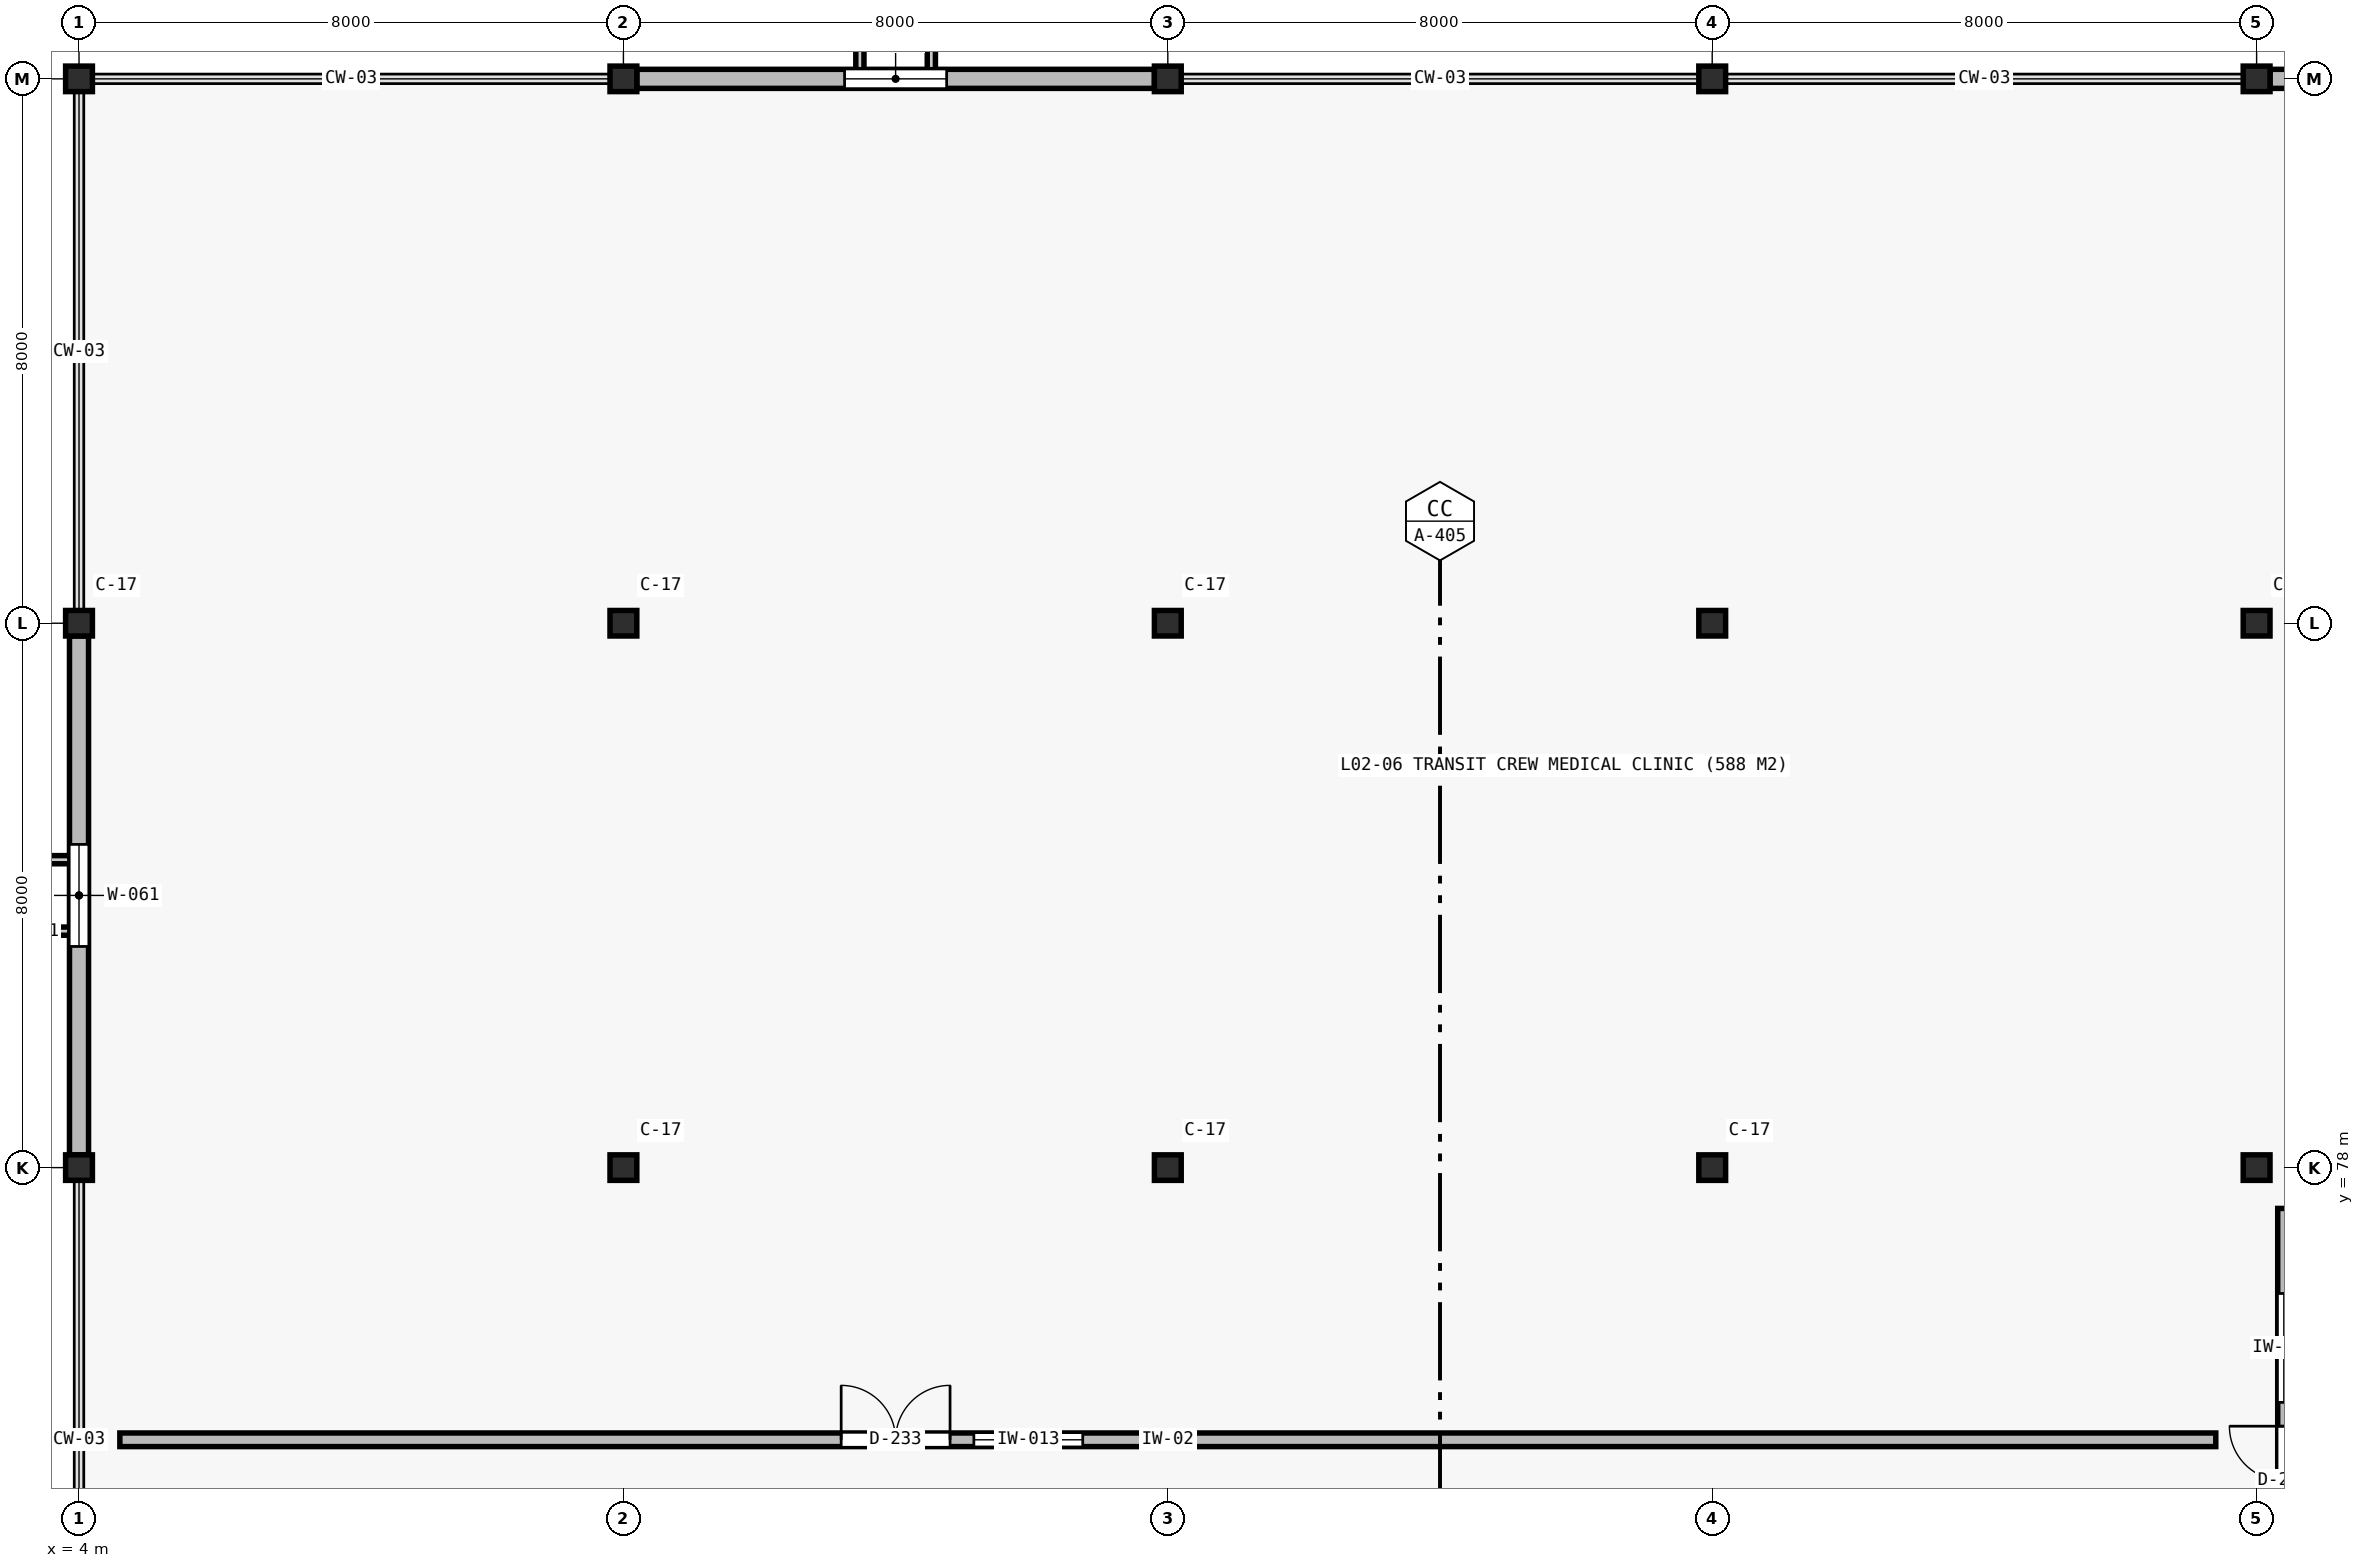
"""IFC4 building model, lengths in metres.
Left out: names, types, materials, properties, quantities, classifications, styles, units other than length and angle.
Written with IfcOpenShell. Run it as: python <this file> out.ifc"""

import sys

from ifc_helpers import new_model, si_unit, direction, frame, frame_2d, origin, origin_2d, place, context, subcontext, project, spatial, rectangle, i_section, extrude, element, fill, save


model = new_model("IFC4")
c1 = context("Model", 3, precision=1e-05, world=origin(), true_north=direction((0.0, 1.0)))
c2 = subcontext(c1, "Body", "Model", "MODEL_VIEW")
j1 = project(units=[si_unit("LENGTHUNIT", "METRE"), si_unit("PLANEANGLEUNIT", "RADIAN")], contexts=[c1])
p1 = place(None, origin())
s1 = spatial("IfcSite", under=j1, at=p1, CompositionType="ELEMENT")
p2 = place(p1, origin())
s2 = spatial("IfcBuilding", under=s1, at=p2, CompositionType="ELEMENT")
p3 = place(p2, frame((0.0, 0.0, 11.2)))
s3 = spatial("IfcBuildingStorey", under=s2, at=p3, CompositionType="ELEMENT", Elevation=11.2)
for number, where, z_axis, x_axis in (
    (1, (4.0, 78.0, 0.0), (0.0, 0.0, 1.0), (1.0, 0.0, 0.0)),
    (2, (4.0, 86.0, 0.0), (0.0, 0.0, 1.0), (1.0, 0.0, 0.0)),
    (3, (4.0, 94.0, 0.0), (0.0, 0.0, 1.0), (1.0, 0.0, 0.0)),
    (4, (12.0, 78.0, 0.0), (0.0, 0.0, 1.0), (1.0, 0.0, 0.0)),
    (5, (12.0, 86.0, 0.0), (0.0, 0.0, 1.0), (1.0, 0.0, 0.0)),
    (6, (12.0, 94.0, 0.0), (0.0, 0.0, 1.0), (1.0, 0.0, 0.0)),
    (7, (20.0, 78.0, 0.0), (0.0, 0.0, 1.0), (1.0, 0.0, 0.0)),
    (8, (20.0, 86.0, 0.0), (0.0, 0.0, 1.0), (1.0, 0.0, 0.0)),
    (9, (20.0, 94.0, 0.0), (0.0, 0.0, 1.0), (1.0, 0.0, 0.0)),
    (10, (28.0, 78.0, 0.0), (0.0, 0.0, 1.0), (1.0, 0.0, 0.0)),
    (11, (28.0, 86.0, 0.0), (0.0, 0.0, 1.0), (1.0, 0.0, 0.0)),
    (12, (28.0, 94.0, 0.0), (0.0, 0.0, 1.0), (1.0, 0.0, 0.0)),
    (13, (36.0, 78.0, 0.0), (0.0, 0.0, 1.0), (1.0, 0.0, 0.0)),
    (14, (36.0, 86.0, 0.0), (0.0, 0.0, 1.0), (1.0, 0.0, 0.0)),
    (15, (36.0, 94.0, 0.0), (0.0, 0.0, 1.0), (1.0, 0.0, 0.0)),
):
    element("IfcColumn", number, at=place(p3, frame(where, z_axis=z_axis, x_axis=x_axis)), inside=s3, PredefinedType="COLUMN", context=c2, shape_type="SweptSolid", body=[
        extrude(i_section(OverallWidth=0.394, OverallDepth=0.375, WebThickness=0.017, FlangeThickness=0.028, at=origin_2d()), origin(), (0.0, 0.0, 1.0), 4.0),
    ])
p4 = place(p3, frame((4.0, 78.188, 0.0), z_axis=(0.0, 0.0, 1.0), x_axis=(0.0, 1.0, 0.0)))
e16 = element("IfcWall", 16, at=p4, inside=s3, PredefinedType="STANDARD", context=c2, shape_type="SweptSolid", body=[
    extrude(rectangle(XDim=7.625, YDim=0.28, at=frame_2d((3.812, 0.0))), origin(), (0.0, 0.0, 1.0), 3.25),
])
p5 = place(p4, frame((3.062, 0.0, 0.95)))
e17 = element("IfcOpeningElement", 17, at=p5, cuts=e16, PredefinedType="OPENING", context=c2, shape_type="SweptSolid", body=[
    extrude(rectangle(XDim=1.5, YDim=2.0, at=frame_2d((0.75, 1.0))), frame((0.0, 0.15, 0.0), z_axis=(0.0, -1.0, 0.0), x_axis=(1.0, 0.0, 0.0)), (0.0, 0.0, 1.0), 0.3),
])
p6 = place(p3, frame((12.197, 94.0, 0.0), z_axis=(0.0, 0.0, 1.0), x_axis=(1.0, 0.0, 0.0)))
e18 = element("IfcWall", 18, at=p6, inside=s3, PredefinedType="STANDARD", context=c2, shape_type="SweptSolid", body=[
    extrude(rectangle(XDim=7.606, YDim=0.28, at=frame_2d((3.803, 0.0))), origin(), (0.0, 0.0, 1.0), 3.25),
])
p7 = place(p6, frame((3.053, 0.0, 0.95)))
e19 = element("IfcOpeningElement", 19, at=p7, cuts=e18, PredefinedType="OPENING", context=c2, shape_type="SweptSolid", body=[
    extrude(rectangle(XDim=1.5, YDim=2.0, at=frame_2d((0.75, 1.0))), frame((0.0, 0.15, 0.0), z_axis=(0.0, -1.0, 0.0), x_axis=(1.0, 0.0, 0.0)), (0.0, 0.0, 1.0), 0.3),
])
p8 = place(p3, frame((36.197, 94.0, 0.0), z_axis=(0.0, 0.0, 1.0), x_axis=(1.0, 0.0, 0.0)))
e20 = element("IfcWall", 20, at=p8, inside=s3, PredefinedType="STANDARD", context=c2, shape_type="SweptSolid", body=[
    extrude(rectangle(XDim=7.606, YDim=0.28, at=frame_2d((3.803, 0.0))), origin(), (0.0, 0.0, 1.0), 3.25),
])
p9 = place(p8, frame((3.053, 0.0, 0.95)))
e21 = element("IfcOpeningElement", 21, at=p9, cuts=e20, PredefinedType="OPENING", context=c2, shape_type="SweptSolid", body=[
    extrude(rectangle(XDim=1.5, YDim=2.0, at=frame_2d((0.75, 1.0))), frame((0.0, 0.15, 0.0), z_axis=(0.0, -1.0, 0.0), x_axis=(1.0, 0.0, 0.0)), (0.0, 0.0, 1.0), 0.3),
])
p10 = place(p3, frame((4.6, 74.0, 0.0), z_axis=(0.0, 0.0, 1.0), x_axis=(1.0, 0.0, 0.0)))
e22 = element("IfcWall", 22, at=p10, inside=s3, PredefinedType="PARTITIONING", context=c2, shape_type="SweptSolid", body=[
    extrude(rectangle(XDim=30.8, YDim=0.2, at=frame_2d((15.4, 0.0))), origin(), (0.0, 0.0, 1.0), 4.0),
])
p11 = place(p10, frame((10.6, 0.0, 0.0)))
e23 = element("IfcOpeningElement", 23, at=p11, cuts=e22, PredefinedType="OPENING", context=c2, shape_type="SweptSolid", body=[
    extrude(rectangle(XDim=1.6, YDim=2.2, at=frame_2d((0.8, 1.1))), frame((0.0, 0.11, 0.0), z_axis=(0.0, -1.0, 0.0), x_axis=(1.0, 0.0, 0.0)), (0.0, 0.0, 1.0), 0.22),
])
p12 = place(p10, frame((12.55, 0.0, 0.95)))
e24 = element("IfcOpeningElement", 24, at=p12, cuts=e22, PredefinedType="OPENING", context=c2, shape_type="SweptSolid", body=[
    extrude(rectangle(XDim=1.6, YDim=1.3, at=frame_2d((0.8, 0.65))), frame((0.0, 0.11, 0.0), z_axis=(0.0, -1.0, 0.0), x_axis=(1.0, 0.0, 0.0)), (0.0, 0.0, 1.0), 0.22),
])
p13 = place(p3, frame((36.4, 70.2, 0.0), z_axis=(0.0, 0.0, 1.0), x_axis=(0.0, 1.0, 0.0)))
e25 = element("IfcWall", 25, at=p13, inside=s3, PredefinedType="PARTITIONING", context=c2, shape_type="SweptSolid", body=[
    extrude(rectangle(XDim=7.2, YDim=0.18, at=frame_2d((3.6, 0.0))), origin(), (0.0, 0.0, 1.0), 4.0),
])
p14 = place(p13, frame((2.4, 0.0, 0.0)))
e26 = element("IfcOpeningElement", 26, at=p14, cuts=e25, PredefinedType="OPENING", context=c2, shape_type="SweptSolid", body=[
    extrude(rectangle(XDim=1.6, YDim=2.2, at=frame_2d((0.8, 1.1))), frame((0.0, 0.1, 0.0), z_axis=(0.0, -1.0, 0.0), x_axis=(1.0, 0.0, 0.0)), (0.0, 0.0, 1.0), 0.2),
])
p15 = place(p13, frame((4.35, 0.0, 0.95)))
e27 = element("IfcOpeningElement", 27, at=p15, cuts=e25, PredefinedType="OPENING", context=c2, shape_type="SweptSolid", body=[
    extrude(rectangle(XDim=1.6, YDim=1.3, at=frame_2d((0.8, 0.65))), frame((0.0, 0.1, 0.0), z_axis=(0.0, -1.0, 0.0), x_axis=(1.0, 0.0, 0.0)), (0.0, 0.0, 1.0), 0.2),
])
p16 = place(p5, origin())
e28 = element("IfcWindow", 28, at=p16, inside=s3, PartitioningType="SINGLE_PANEL", PredefinedType="WINDOW", context=c2, shape_type="SweptSolid", body=[
    extrude(rectangle(XDim=1.5, YDim=2.0, at=frame_2d((0.75, 1.0))), frame((0.0, 0.03, 0.0), z_axis=(0.0, -1.0, 0.0), x_axis=(1.0, 0.0, 0.0)), (0.0, 0.0, 1.0), 0.06),
])
fill(e17, e28)
p17 = place(p7, origin())
e29 = element("IfcWindow", 29, at=p17, inside=s3, PartitioningType="SINGLE_PANEL", PredefinedType="WINDOW", context=c2, shape_type="SweptSolid", body=[
    extrude(rectangle(XDim=1.5, YDim=2.0, at=frame_2d((0.75, 1.0))), frame((0.0, 0.03, 0.0), z_axis=(0.0, -1.0, 0.0), x_axis=(1.0, 0.0, 0.0)), (0.0, 0.0, 1.0), 0.06),
])
fill(e19, e29)
p18 = place(p11, origin())
e30 = element("IfcDoor", 30, at=p18, inside=s3, OperationType="DOUBLE_DOOR_SINGLE_SWING", PredefinedType="DOOR", context=c2, shape_type="SweptSolid", body=[
    extrude(rectangle(XDim=1.6, YDim=2.2, at=frame_2d((0.8, 1.1))), frame((0.0, 0.025, 0.0), z_axis=(0.0, -1.0, 0.0), x_axis=(1.0, 0.0, 0.0)), (0.0, 0.0, 1.0), 0.05),
])
fill(e23, e30)
p19 = place(p12, origin())
e31 = element("IfcWindow", 31, at=p19, inside=s3, PartitioningType="SINGLE_PANEL", PredefinedType="WINDOW", context=c2, shape_type="SweptSolid", body=[
    extrude(rectangle(XDim=1.6, YDim=1.3, at=frame_2d((0.8, 0.65))), frame((0.0, 0.03, 0.0), z_axis=(0.0, -1.0, 0.0), x_axis=(1.0, 0.0, 0.0)), (0.0, 0.0, 1.0), 0.06),
])
fill(e24, e31)
p20 = place(p14, origin())
e32 = element("IfcDoor", 32, at=p20, inside=s3, OperationType="DOUBLE_DOOR_SINGLE_SWING", PredefinedType="DOOR", context=c2, shape_type="SweptSolid", body=[
    extrude(rectangle(XDim=1.6, YDim=2.2, at=frame_2d((0.8, 1.1))), frame((0.0, 0.025, 0.0), z_axis=(0.0, -1.0, 0.0), x_axis=(1.0, 0.0, 0.0)), (0.0, 0.0, 1.0), 0.05),
])
fill(e26, e32)
p21 = place(p15, origin())
e33 = element("IfcWindow", 33, at=p21, inside=s3, PartitioningType="SINGLE_PANEL", PredefinedType="WINDOW", context=c2, shape_type="SweptSolid", body=[
    extrude(rectangle(XDim=1.6, YDim=1.3, at=frame_2d((0.8, 0.65))), frame((0.0, 0.03, 0.0), z_axis=(0.0, -1.0, 0.0), x_axis=(1.0, 0.0, 0.0)), (0.0, 0.0, 1.0), 0.06),
])
fill(e27, e33)
save(model, sys.argv[1])
